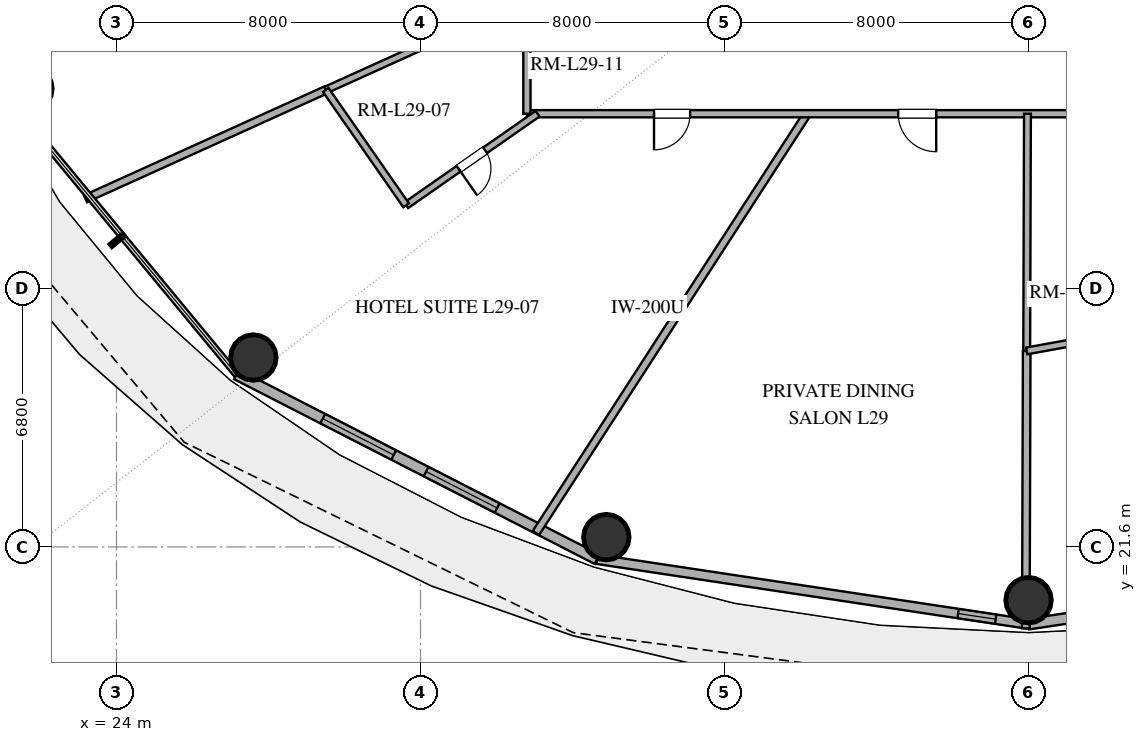
"""IFC4 building model, lengths in metres.
Left out: names, types, materials, properties, quantities, classifications, styles, units other than length and angle.
Written with IfcOpenShell. Run it as: python <this file> out.ifc"""

import sys

from ifc_helpers import new_model, si_unit, direction, frame, frame_2d, origin, origin_2d, place, context, subcontext, project, spatial, rectangle, hollow_circle, extrude, element, fill, save


model = new_model("IFC4")
c1 = context("Model", 3, precision=1e-05, world=origin(), true_north=direction((0.0, 1.0)))
c2 = subcontext(c1, "Body", "Model", "MODEL_VIEW")
j1 = project(units=[si_unit("LENGTHUNIT", "METRE"), si_unit("PLANEANGLEUNIT", "RADIAN")], contexts=[c1])
p1 = place(None, origin())
s1 = spatial("IfcSite", under=j1, at=p1, CompositionType="ELEMENT")
p2 = place(p1, origin())
s2 = spatial("IfcBuilding", under=s1, at=p2, CompositionType="ELEMENT")
p3 = place(p2, frame((0.0, 0.0, 116.4)))
s3 = spatial("IfcBuildingStorey", under=s2, at=p3, CompositionType="ELEMENT", Elevation=116.4)
for number, where, z_axis, x_axis in (
    (1, (21.709, 33.657, 0.0), (0.0, 0.0, 1.0), (1.0, 0.0, 0.0)),
    (2, (27.602, 26.585, 0.0), (0.0, 0.0, 1.0), (1.0, 0.0, 0.0)),
    (3, (36.89, 21.859, 0.0), (0.0, 0.0, 1.0), (1.0, 0.0, 0.0)),
    (4, (48.0, 20.2, 0.0), (0.0, 0.0, 1.0), (1.0, 0.0, 0.0)),
):
    element("IfcColumn", number, at=place(p3, frame(where, z_axis=z_axis, x_axis=x_axis)), inside=s3, PredefinedType="COLUMN", context=c2, shape_type="SweptSolid", body=[
        extrude(hollow_circle(Radius=0.6, WallThickness=0.032, at=origin_2d()), origin(), (0.0, 0.0, 1.0), 3.38),
    ])
p4 = place(p3, frame((27.16, 26.14, 0.0), z_axis=(0.0, 0.0, 1.0), x_axis=(0.889959505023, -0.45603955905, 0.0)))
e5 = element("IfcWall", 5, at=p4, inside=s3, PredefinedType="SOLIDWALL", context=c2, shape_type="SweptSolid", body=[
    extrude(rectangle(XDim=10.662, YDim=0.28, at=frame_2d((5.331, 0.0))), origin(), (0.0, 0.0, 1.0), 3.38),
])
p5 = place(p4, frame((2.548, 0.0, 0.85)))
e6 = element("IfcOpeningElement", 6, at=p5, cuts=e5, PredefinedType="OPENING", context=c2, shape_type="SweptSolid", body=[
    extrude(rectangle(XDim=2.1, YDim=2.2, at=frame_2d((1.05, 1.1))), frame((0.0, 0.15, 0.0), z_axis=(0.0, -1.0, 0.0), x_axis=(1.0, 0.0, 0.0)), (0.0, 0.0, 1.0), 0.3),
])
p6 = place(p4, frame((5.605, 0.0, 0.85)))
e7 = element("IfcOpeningElement", 7, at=p6, cuts=e5, PredefinedType="OPENING", context=c2, shape_type="SweptSolid", body=[
    extrude(rectangle(XDim=2.1, YDim=2.2, at=frame_2d((1.05, 1.1))), frame((0.0, 0.15, 0.0), z_axis=(0.0, -1.0, 0.0), x_axis=(1.0, 0.0, 0.0)), (0.0, 0.0, 1.0), 0.3),
])
p7 = place(p3, frame((36.649, 21.277, 0.0), z_axis=(0.0, 0.0, 1.0), x_axis=(0.988877774656, -0.148730450117, 0.0)))
e8 = element("IfcWall", 8, at=p7, inside=s3, PredefinedType="SOLIDWALL", context=c2, shape_type="SweptSolid", body=[
    extrude(rectangle(XDim=11.479, YDim=0.25, at=frame_2d((5.74, 0.0))), origin(), (0.0, 0.0, 1.0), 3.38),
])
p8 = place(p7, frame((9.605, 0.0, 1.42)))
e9 = element("IfcOpeningElement", 9, at=p8, cuts=e8, PredefinedType="OPENING", context=c2, shape_type="SweptSolid", body=[
    extrude(rectangle(XDim=1.0, YDim=1.05, at=frame_2d((0.5, 0.525))), frame((0.0, 0.135, 0.0), z_axis=(0.0, -1.0, 0.0), x_axis=(1.0, 0.0, 0.0)), (0.0, 0.0, 1.0), 0.27),
])
p9 = place(p3, frame((48.0, 19.57, 0.0), z_axis=(0.0, 0.0, 1.0), x_axis=(0.988877774656, 0.148730450117, 0.0)))
e10 = element("IfcWall", 10, at=p9, inside=s3, PredefinedType="SOLIDWALL", context=c2, shape_type="SweptSolid", body=[
    extrude(rectangle(XDim=11.479, YDim=0.28, at=frame_2d((5.74, 0.0))), origin(), (0.0, 0.0, 1.0), 3.38),
])
p10 = place(p9, frame((1.524, 0.0, 0.0)))
e11 = element("IfcOpeningElement", 11, at=p10, cuts=e10, PredefinedType="OPENING", context=c2, shape_type="SweptSolid", body=[
    extrude(rectangle(XDim=1.6, YDim=2.25, at=frame_2d((0.8, 1.125))), frame((0.0, 0.15, 0.0), z_axis=(0.0, -1.0, 0.0), x_axis=(1.0, 0.0, 0.0)), (0.0, 0.0, 1.0), 0.3),
])
p11 = place(p3, frame((35.037, 21.969, 0.0), z_axis=(0.0, 0.0, 1.0), x_axis=(0.543298274368, 0.839539745973, 0.0)))
e12 = element("IfcWall", 12, at=p11, inside=s3, PredefinedType="PARTITIONING", context=c2, shape_type="SweptSolid", body=[
    extrude(rectangle(XDim=13.139, YDim=0.2, at=frame_2d((6.57, 0.0))), origin(), (0.0, 0.0, 1.0), 2.74),
])
p12 = place(p3, frame((47.928, 19.461, 0.0), z_axis=(0.0, 0.0, 1.0), x_axis=(0.003178198127, 0.999994949516, 0.0)))
e13 = element("IfcWall", 13, at=p12, inside=s3, PredefinedType="PARTITIONING", context=c2, shape_type="SweptSolid", body=[
    extrude(rectangle(XDim=7.298, YDim=0.2, at=frame_2d((3.649, 0.0))), origin(), (0.0, 0.0, 1.0), 2.74),
])
p13 = place(p3, frame((49.671, 33.0, 0.0), z_axis=(0.0, 0.0, 1.0), x_axis=(-1.0, 0.0, 0.0)))
e14 = element("IfcWall", 14, at=p13, inside=s3, PredefinedType="PARTITIONING", context=c2, shape_type="SweptSolid", body=[
    extrude(rectangle(XDim=14.871, YDim=0.19, at=frame_2d((7.436, 0.0))), origin(), (0.0, 0.0, 1.0), 2.74),
])
p14 = place(p13, frame((10.576, 0.0, 0.0)))
e15 = element("IfcOpeningElement", 15, at=p14, cuts=e14, PredefinedType="OPENING", context=c2, shape_type="SweptSolid", body=[
    extrude(rectangle(XDim=0.95, YDim=2.15, at=frame_2d((0.475, 1.075))), frame((0.0, 0.105, 0.0), z_axis=(0.0, -1.0, 0.0), x_axis=(1.0, 0.0, 0.0)), (0.0, 0.0, 1.0), 0.21),
])
p15 = place(p13, frame((4.101, 0.0, 0.0)))
e16 = element("IfcOpeningElement", 16, at=p15, cuts=e14, PredefinedType="OPENING", context=c2, shape_type="SweptSolid", body=[
    extrude(rectangle(XDim=1.0, YDim=2.2, at=frame_2d((0.5, 1.1))), frame((0.0, 0.105, 0.0), z_axis=(0.0, -1.0, 0.0), x_axis=(1.0, 0.0, 0.0)), (0.0, 0.0, 1.0), 0.21),
])
p16 = place(p3, frame((23.185, 30.762, 0.0), z_axis=(0.0, 0.0, 1.0), x_axis=(0.910940213411, 0.412538395292, 0.0)))
e17 = element("IfcWall", 17, at=p16, inside=s3, PredefinedType="PARTITIONING", context=c2, shape_type="SweptSolid", body=[
    extrude(rectangle(XDim=6.941, YDim=0.2, at=frame_2d((3.47, 0.0))), origin(), (0.0, 0.0, 1.0), 2.74),
])
p17 = place(p3, frame((47.952, 26.758, 0.0), z_axis=(0.0, 0.0, 1.0), x_axis=(0.003168254458, 0.999994981069, 0.0)))
e18 = element("IfcWall", 18, at=p17, inside=s3, PredefinedType="PLUMBINGWALL", context=c2, shape_type="SweptSolid", body=[
    extrude(rectangle(XDim=6.242, YDim=0.18, at=frame_2d((3.121, 0.0))), origin(), (0.0, 0.0, 1.0), 2.74),
])
p18 = place(p3, frame((29.507, 33.625, 0.0), z_axis=(0.0, 0.0, 1.0), x_axis=(0.910959840523, 0.412495053248, 0.0)))
e19 = element("IfcWall", 19, at=p18, inside=s3, PredefinedType="PLUMBINGWALL", context=c2, shape_type="SweptSolid", body=[
    extrude(rectangle(XDim=5.81, YDim=0.18, at=frame_2d((2.905, 0.0))), origin(), (0.0, 0.0, 1.0), 2.74),
])
p19 = place(p3, frame((34.8, 33.0, 0.0), z_axis=(0.0, 0.0, 1.0), x_axis=(0.0, 1.0, 0.0)))
e20 = element("IfcWall", 20, at=p19, inside=s3, PredefinedType="PARTITIONING", context=c2, shape_type="SweptSolid", body=[
    extrude(rectangle(XDim=8.54, YDim=0.19, at=frame_2d((4.27, 0.0))), origin(), (0.0, 0.0, 1.0), 2.74),
])
p20 = place(p19, frame((5.288, 0.0, 0.0)))
e21 = element("IfcOpeningElement", 21, at=p20, cuts=e20, PredefinedType="OPENING", context=c2, shape_type="SweptSolid", body=[
    extrude(rectangle(XDim=0.95, YDim=2.15, at=frame_2d((0.475, 1.075))), frame((0.0, 0.105, 0.0), z_axis=(0.0, -1.0, 0.0), x_axis=(1.0, 0.0, 0.0)), (0.0, 0.0, 1.0), 0.21),
])
p21 = place(p3, frame((35.081, 33.0, 0.0), z_axis=(0.0, 0.0, 1.0), x_axis=(-0.820508449427, -0.571634397512, 0.0)))
e22 = element("IfcWall", 22, at=p21, inside=s3, PredefinedType="PLUMBINGWALL", context=c2, shape_type="SweptSolid", body=[
    extrude(rectangle(XDim=4.216, YDim=0.18, at=frame_2d((2.108, 0.0))), origin(), (0.0, 0.0, 1.0), 2.74),
])
p22 = place(p21, frame((1.683, 0.0, 0.0)))
e23 = element("IfcOpeningElement", 23, at=p22, cuts=e22, PredefinedType="OPENING", context=c2, shape_type="SweptSolid", body=[
    extrude(rectangle(XDim=0.85, YDim=2.1, at=frame_2d((0.425, 1.05))), frame((0.0, 0.1, 0.0), z_axis=(0.0, -1.0, 0.0), x_axis=(1.0, 0.0, 0.0)), (0.0, 0.0, 1.0), 0.2),
])
p23 = place(p3, frame((31.622, 30.59, 0.0), z_axis=(0.0, 0.0, 1.0), x_axis=(-0.571609603384, 0.820525722521, 0.0)))
e24 = element("IfcWall", 24, at=p23, inside=s3, PredefinedType="PLUMBINGWALL", context=c2, shape_type="SweptSolid", body=[
    extrude(rectangle(XDim=3.7, YDim=0.18, at=frame_2d((1.85, 0.0))), origin(), (0.0, 0.0, 1.0), 2.74),
])
p24 = place(p3, frame((50.684, 27.256, 0.0), z_axis=(0.0, 0.0, 1.0), x_axis=(-0.983824875987, -0.17913294892, 0.0)))
e25 = element("IfcWall", 25, at=p24, inside=s3, PredefinedType="PLUMBINGWALL", context=c2, shape_type="SweptSolid", body=[
    extrude(rectangle(XDim=2.778, YDim=0.18, at=frame_2d((1.389, 0.0))), origin(), (0.0, 0.0, 1.0), 2.74),
])
p25 = place(p5, origin())
e26 = element("IfcWindow", 26, at=p25, inside=s3, PartitioningType="SINGLE_PANEL", PredefinedType="WINDOW", context=c2, shape_type="SweptSolid", body=[
    extrude(rectangle(XDim=2.1, YDim=2.2, at=frame_2d((1.05, 1.1))), frame((0.0, 0.03, 0.0), z_axis=(0.0, -1.0, 0.0), x_axis=(1.0, 0.0, 0.0)), (0.0, 0.0, 1.0), 0.06),
])
fill(e6, e26)
p26 = place(p6, origin())
e27 = element("IfcWindow", 27, at=p26, inside=s3, PartitioningType="SINGLE_PANEL", PredefinedType="WINDOW", context=c2, shape_type="SweptSolid", body=[
    extrude(rectangle(XDim=2.1, YDim=2.2, at=frame_2d((1.05, 1.1))), frame((0.0, 0.03, 0.0), z_axis=(0.0, -1.0, 0.0), x_axis=(1.0, 0.0, 0.0)), (0.0, 0.0, 1.0), 0.06),
])
fill(e7, e27)
p27 = place(p8, origin())
e28 = element("IfcWindow", 28, at=p27, inside=s3, PartitioningType="SINGLE_PANEL", PredefinedType="WINDOW", context=c2, shape_type="SweptSolid", body=[
    extrude(rectangle(XDim=1.0, YDim=1.05, at=frame_2d((0.5, 0.525))), frame((0.0, 0.03, 0.0), z_axis=(0.0, -1.0, 0.0), x_axis=(1.0, 0.0, 0.0)), (0.0, 0.0, 1.0), 0.06),
])
fill(e9, e28)
p28 = place(p14, origin())
e29 = element("IfcDoor", 29, at=p28, inside=s3, OperationType="SINGLE_SWING_RIGHT", PredefinedType="DOOR", context=c2, shape_type="SweptSolid", body=[
    extrude(rectangle(XDim=0.95, YDim=2.15, at=frame_2d((0.475, 1.075))), frame((0.0, 0.025, 0.0), z_axis=(0.0, -1.0, 0.0), x_axis=(1.0, 0.0, 0.0)), (0.0, 0.0, 1.0), 0.05),
])
fill(e15, e29)
p29 = place(p15, origin())
e30 = element("IfcDoor", 30, at=p29, inside=s3, OperationType="SINGLE_SWING_LEFT", PredefinedType="DOOR", context=c2, shape_type="SweptSolid", body=[
    extrude(rectangle(XDim=1.0, YDim=2.2, at=frame_2d((0.5, 1.1))), frame((0.0, 0.025, 0.0), z_axis=(0.0, -1.0, 0.0), x_axis=(1.0, 0.0, 0.0)), (0.0, 0.0, 1.0), 0.05),
])
fill(e16, e30)
p30 = place(p22, origin())
e31 = element("IfcDoor", 31, at=p30, inside=s3, OperationType="SINGLE_SWING_RIGHT", PredefinedType="DOOR", context=c2, shape_type="SweptSolid", body=[
    extrude(rectangle(XDim=0.85, YDim=2.1, at=frame_2d((0.425, 1.05))), frame((0.0, 0.025, 0.0), z_axis=(0.0, -1.0, 0.0), x_axis=(1.0, 0.0, 0.0)), (0.0, 0.0, 1.0), 0.05),
])
fill(e23, e31)
save(model, sys.argv[1])
